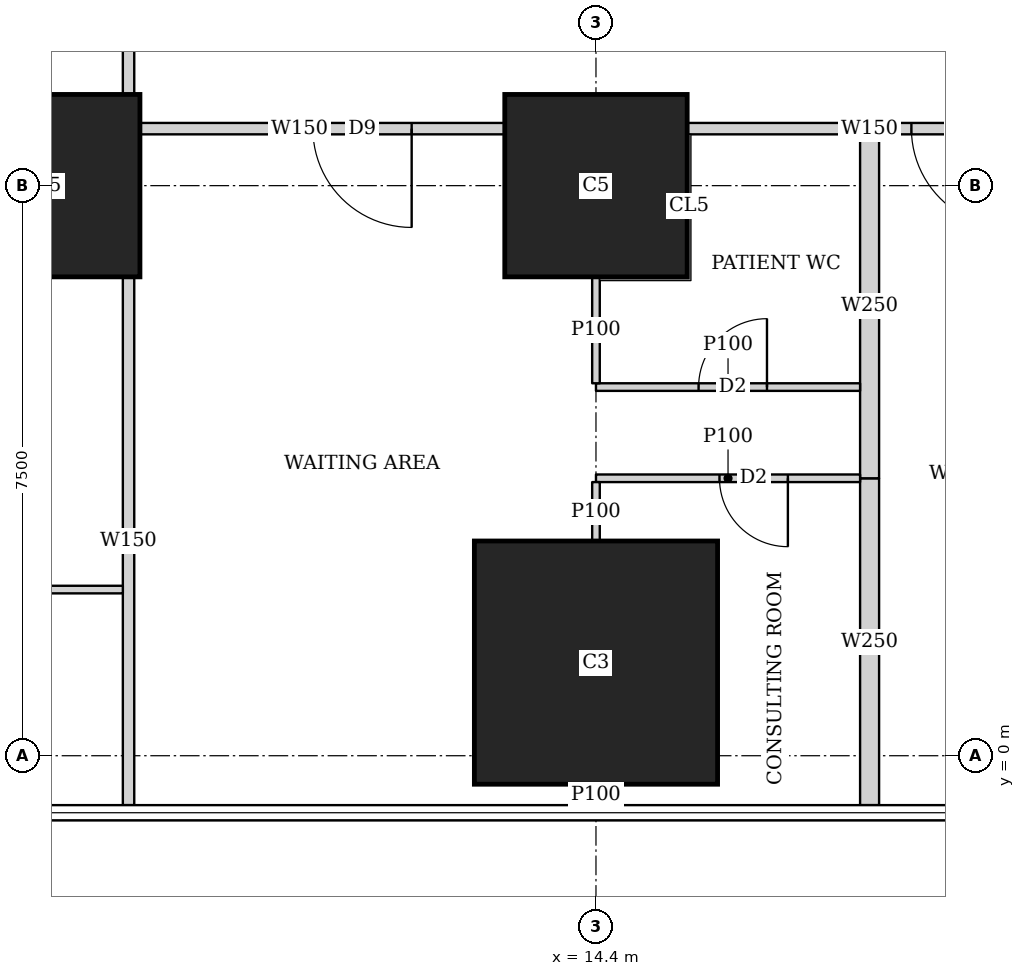
"""IFC4 building model, lengths in metres.
Left out: names, types, materials, properties, quantities, classifications, styles, units other than length and angle.
Written with IfcOpenShell. Run it as: python <this file> out.ifc"""

import sys

from ifc_helpers import new_model, si_unit, direction, frame, frame_2d, origin, origin_2d, place, context, subcontext, project, spatial, rectangle, extrude, element, fill, save


model = new_model("IFC4")
c1 = context("Model", 3, precision=1e-05, world=origin(), true_north=direction((0.0, 1.0)))
c2 = subcontext(c1, "Body", "Model", "MODEL_VIEW")
j1 = project(units=[si_unit("LENGTHUNIT", "METRE"), si_unit("PLANEANGLEUNIT", "RADIAN")], contexts=[c1])
p1 = place(None, origin())
s1 = spatial("IfcSite", under=j1, at=p1, CompositionType="ELEMENT")
p2 = place(p1, origin())
s2 = spatial("IfcBuilding", under=s1, at=p2, CompositionType="ELEMENT")
p3 = place(p2, frame((0.0, 0.0, 5.6)))
s3 = spatial("IfcBuildingStorey", under=s2, at=p3, CompositionType="ELEMENT", Elevation=5.6)
p4 = place(p3, frame((14.4, 1.225, 0.0), z_axis=(0.0, 0.0, 1.0), x_axis=(1.0, 0.0, 0.0)))
e1 = element("IfcColumn", 1, at=p4, inside=s3, PredefinedType="COLUMN", context=c2, shape_type="SweptSolid", body=[
    extrude(rectangle(XDim=3.2, YDim=3.2, at=origin_2d()), origin(), (0.0, 0.0, 1.0), 4.5),
])
for number, where, z_axis, x_axis in (
    (2, (7.2, 7.5, 0.0), (0.0, 0.0, 1.0), (1.0, 0.0, 0.0)),
    (3, (14.4, 7.5, 0.0), (0.0, 0.0, 1.0), (1.0, 0.0, 0.0)),
):
    element("IfcColumn", number, at=place(p3, frame(where, z_axis=z_axis, x_axis=x_axis)), inside=s3, PredefinedType="COLUMN", context=c2, shape_type="SweptSolid", body=[
        extrude(rectangle(XDim=2.4, YDim=2.4, at=origin_2d()), origin(), (0.0, 0.0, 1.0), 4.5),
    ])
p5 = place(p3, frame((8.25, -0.65, 0.0), z_axis=(0.0, 0.0, 1.0), x_axis=(0.0, 1.0, 0.0)))
e4 = element("IfcWall", 4, at=p5, inside=s3, PredefinedType="SOLIDWALL", context=c2, shape_type="SweptSolid", body=[
    extrude(rectangle(XDim=6.949, YDim=0.15, at=frame_2d((3.475, 0.0))), origin(), (0.0, 0.0, 1.0), 2.4),
])
p6 = place(p3, frame((8.25, 8.701, 0.0), z_axis=(0.0, 0.0, 1.0), x_axis=(0.0, 1.0, 0.0)))
e5 = element("IfcWall", 5, at=p6, inside=s3, PredefinedType="SOLIDWALL", context=c2, shape_type="SweptSolid", body=[
    extrude(rectangle(XDim=5.098, YDim=0.15, at=frame_2d((2.549, 0.0))), origin(), (0.0, 0.0, 1.0), 4.2),
])
p7 = place(p6, frame((0.661, 0.0, 0.0)))
e6 = element("IfcOpeningElement", 6, at=p7, cuts=e5, PredefinedType="OPENING", context=c2, shape_type="SweptSolid", body=[
    extrude(rectangle(XDim=1.3, YDim=2.1, at=frame_2d((0.65, 1.05))), frame((0.0, 0.085, 0.0), z_axis=(0.0, -1.0, 0.0), x_axis=(1.0, 0.0, 0.0)), (0.0, 0.0, 1.0), 0.17),
])
p8 = place(p6, frame((3.136, 0.0, 0.0)))
e7 = element("IfcOpeningElement", 7, at=p8, cuts=e5, PredefinedType="OPENING", context=c2, shape_type="SweptSolid", body=[
    extrude(rectangle(XDim=1.3, YDim=2.1, at=frame_2d((0.65, 1.05))), frame((0.0, 0.085, 0.0), z_axis=(0.0, -1.0, 0.0), x_axis=(1.0, 0.0, 0.0)), (0.0, 0.0, 1.0), 0.17),
])
p9 = place(p3, frame((20.399, 8.25, 0.0), z_axis=(0.0, 0.0, 1.0), x_axis=(-1.0, 0.0, 0.0)))
e8 = element("IfcWall", 8, at=p9, inside=s3, PredefinedType="SOLIDWALL", context=c2, shape_type="SweptSolid", body=[
    extrude(rectangle(XDim=4.798, YDim=0.15, at=frame_2d((2.399, 0.0))), origin(), (0.0, 0.0, 1.0), 2.6),
])
p10 = place(p9, frame((0.549, 0.0, 0.0)))
e9 = element("IfcOpeningElement", 9, at=p10, cuts=e8, PredefinedType="OPENING", context=c2, shape_type="SweptSolid", body=[
    extrude(rectangle(XDim=1.3, YDim=2.1, at=frame_2d((0.65, 1.05))), frame((0.0, 0.085, 0.0), z_axis=(0.0, -1.0, 0.0), x_axis=(1.0, 0.0, 0.0)), (0.0, 0.0, 1.0), 0.17),
])
p11 = place(p3, frame((13.199, 8.25, 0.0), z_axis=(0.0, 0.0, 1.0), x_axis=(-1.0, 0.0, 0.0)))
e10 = element("IfcWall", 10, at=p11, inside=s3, PredefinedType="SOLIDWALL", context=c2, shape_type="SweptSolid", body=[
    extrude(rectangle(XDim=4.798, YDim=0.15, at=frame_2d((2.399, 0.0))), origin(), (0.0, 0.0, 1.0), 2.6),
])
p12 = place(p11, frame((1.224, 0.0, 0.0)))
e11 = element("IfcOpeningElement", 11, at=p12, cuts=e10, PredefinedType="OPENING", context=c2, shape_type="SweptSolid", body=[
    extrude(rectangle(XDim=1.3, YDim=2.1, at=frame_2d((0.65, 1.05))), frame((0.0, 0.085, 0.0), z_axis=(0.0, -1.0, 0.0), x_axis=(1.0, 0.0, 0.0)), (0.0, 0.0, 1.0), 0.17),
])
p13 = place(p3, frame((4.9, 2.186, 0.0), z_axis=(0.0, 0.0, 1.0), x_axis=(1.0, 0.0, 0.0)))
e12 = element("IfcWall", 12, at=p13, inside=s3, PredefinedType="PARTITIONING", context=c2, shape_type="SweptSolid", body=[
    extrude(rectangle(XDim=3.275, YDim=0.1, at=frame_2d((1.638, 0.0))), origin(), (0.0, 0.0, 1.0), 2.4),
])
p14 = place(p3, frame((17.875, 3.65, 0.0), z_axis=(0.0, 0.0, 1.0), x_axis=(-1.0, 0.0, 0.0)))
e13 = element("IfcWall", 13, at=p14, inside=s3, PredefinedType="PARTITIONING", context=c2, shape_type="SweptSolid", body=[
    extrude(rectangle(XDim=3.475, YDim=0.1, at=frame_2d((1.738, 0.0))), origin(), (0.0, 0.0, 1.0), 2.6),
])
p15 = place(p14, frame((0.95, 0.0, 0.0)))
e14 = element("IfcOpeningElement", 14, at=p15, cuts=e13, PredefinedType="OPENING", context=c2, shape_type="SweptSolid", body=[
    extrude(rectangle(XDim=0.9, YDim=2.1, at=frame_2d((0.45, 1.05))), frame((0.0, 0.06, 0.0), z_axis=(0.0, -1.0, 0.0), x_axis=(1.0, 0.0, 0.0)), (0.0, 0.0, 1.0), 0.12),
])
p16 = place(p3, frame((17.875, 4.85, 0.0), z_axis=(0.0, 0.0, 1.0), x_axis=(-1.0, 0.0, 0.0)))
e15 = element("IfcWall", 15, at=p16, inside=s3, PredefinedType="PARTITIONING", context=c2, shape_type="SweptSolid", body=[
    extrude(rectangle(XDim=3.475, YDim=0.1, at=frame_2d((1.738, 0.0))), origin(), (0.0, 0.0, 1.0), 2.6),
])
p17 = place(p16, frame((1.225, 0.0, 0.0)))
e16 = element("IfcOpeningElement", 16, at=p17, cuts=e15, PredefinedType="OPENING", context=c2, shape_type="SweptSolid", body=[
    extrude(rectangle(XDim=0.9, YDim=2.1, at=frame_2d((0.45, 1.05))), frame((0.0, 0.06, 0.0), z_axis=(0.0, -1.0, 0.0), x_axis=(1.0, 0.0, 0.0)), (0.0, 0.0, 1.0), 0.12),
])
p18 = place(p3, frame((14.4, -0.65, 0.0), z_axis=(0.0, 0.0, 1.0), x_axis=(0.0, 1.0, 0.0)))
e17 = element("IfcWall", 17, at=p18, inside=s3, PredefinedType="PARTITIONING", context=c2, shape_type="SweptSolid", body=[
    extrude(rectangle(XDim=0.274, YDim=0.1, at=frame_2d((0.137, 0.0))), origin(), (0.0, 0.0, 1.0), 4.2),
])
p19 = place(p3, frame((14.4, 2.826, 0.0), z_axis=(0.0, 0.0, 1.0), x_axis=(0.0, 1.0, 0.0)))
e18 = element("IfcWall", 18, at=p19, inside=s3, PredefinedType="PARTITIONING", context=c2, shape_type="SweptSolid", body=[
    extrude(rectangle(XDim=0.774, YDim=0.1, at=frame_2d((0.387, 0.0))), origin(), (0.0, 0.0, 1.0), 2.6),
])
p20 = place(p3, frame((14.4, 4.9, 0.0), z_axis=(0.0, 0.0, 1.0), x_axis=(0.0, 1.0, 0.0)))
e19 = element("IfcWall", 19, at=p20, inside=s3, PredefinedType="PARTITIONING", context=c2, shape_type="SweptSolid", body=[
    extrude(rectangle(XDim=1.399, YDim=0.1, at=frame_2d((0.7, 0.0))), origin(), (0.0, 0.0, 1.0), 2.6),
])
p21 = place(p3, frame((18.0, -0.65, 0.0), z_axis=(0.0, 0.0, 1.0), x_axis=(0.0, 1.0, 0.0)))
e20 = element("IfcWall", 20, at=p21, inside=s3, PredefinedType="SOLIDWALL", context=c2, shape_type="SweptSolid", body=[
    extrude(rectangle(XDim=4.3, YDim=0.25, at=frame_2d((2.15, 0.0))), origin(), (0.0, 0.0, 1.0), 2.4),
])
p22 = place(p3, frame((18.0, 3.65, 0.0), z_axis=(0.0, 0.0, 1.0), x_axis=(0.0, 1.0, 0.0)))
e21 = element("IfcWall", 21, at=p22, inside=s3, PredefinedType="SOLIDWALL", context=c2, shape_type="SweptSolid", body=[
    extrude(rectangle(XDim=4.525, YDim=0.25, at=frame_2d((2.263, 0.0))), origin(), (0.0, 0.0, 1.0), 2.6),
])
p23 = place(p15, origin())
e22 = element("IfcDoor", 22, at=p23, inside=s3, OperationType="SINGLE_SWING_LEFT", PredefinedType="DOOR", context=c2, shape_type="SweptSolid", body=[
    extrude(rectangle(XDim=0.9, YDim=2.1, at=frame_2d((0.45, 1.05))), frame((0.0, 0.025, 0.0), z_axis=(0.0, -1.0, 0.0), x_axis=(1.0, 0.0, 0.0)), (0.0, 0.0, 1.0), 0.05),
])
fill(e14, e22)
p24 = place(p17, origin())
e23 = element("IfcDoor", 23, at=p24, inside=s3, OperationType="SINGLE_SWING_RIGHT", PredefinedType="DOOR", context=c2, shape_type="SweptSolid", body=[
    extrude(rectangle(XDim=0.9, YDim=2.1, at=frame_2d((0.45, 1.05))), frame((0.0, 0.025, 0.0), z_axis=(0.0, -1.0, 0.0), x_axis=(1.0, 0.0, 0.0)), (0.0, 0.0, 1.0), 0.05),
])
fill(e16, e23)
p25 = place(p12, origin())
e24 = element("IfcDoor", 24, at=p25, inside=s3, OperationType="DOUBLE_DOOR_SINGLE_SWING", PredefinedType="DOOR", context=c2, shape_type="SweptSolid", body=[
    extrude(rectangle(XDim=1.3, YDim=2.1, at=frame_2d((0.65, 1.05))), frame((0.0, 0.025, 0.0), z_axis=(0.0, -1.0, 0.0), x_axis=(1.0, 0.0, 0.0)), (0.0, 0.0, 1.0), 0.05),
])
fill(e11, e24)
p26 = place(p10, origin())
e25 = element("IfcDoor", 25, at=p26, inside=s3, OperationType="DOUBLE_DOOR_SINGLE_SWING", PredefinedType="DOOR", context=c2, shape_type="SweptSolid", body=[
    extrude(rectangle(XDim=1.3, YDim=2.1, at=frame_2d((0.65, 1.05))), frame((0.0, 0.025, 0.0), z_axis=(0.0, -1.0, 0.0), x_axis=(1.0, 0.0, 0.0)), (0.0, 0.0, 1.0), 0.05),
])
fill(e9, e25)
save(model, sys.argv[1])
